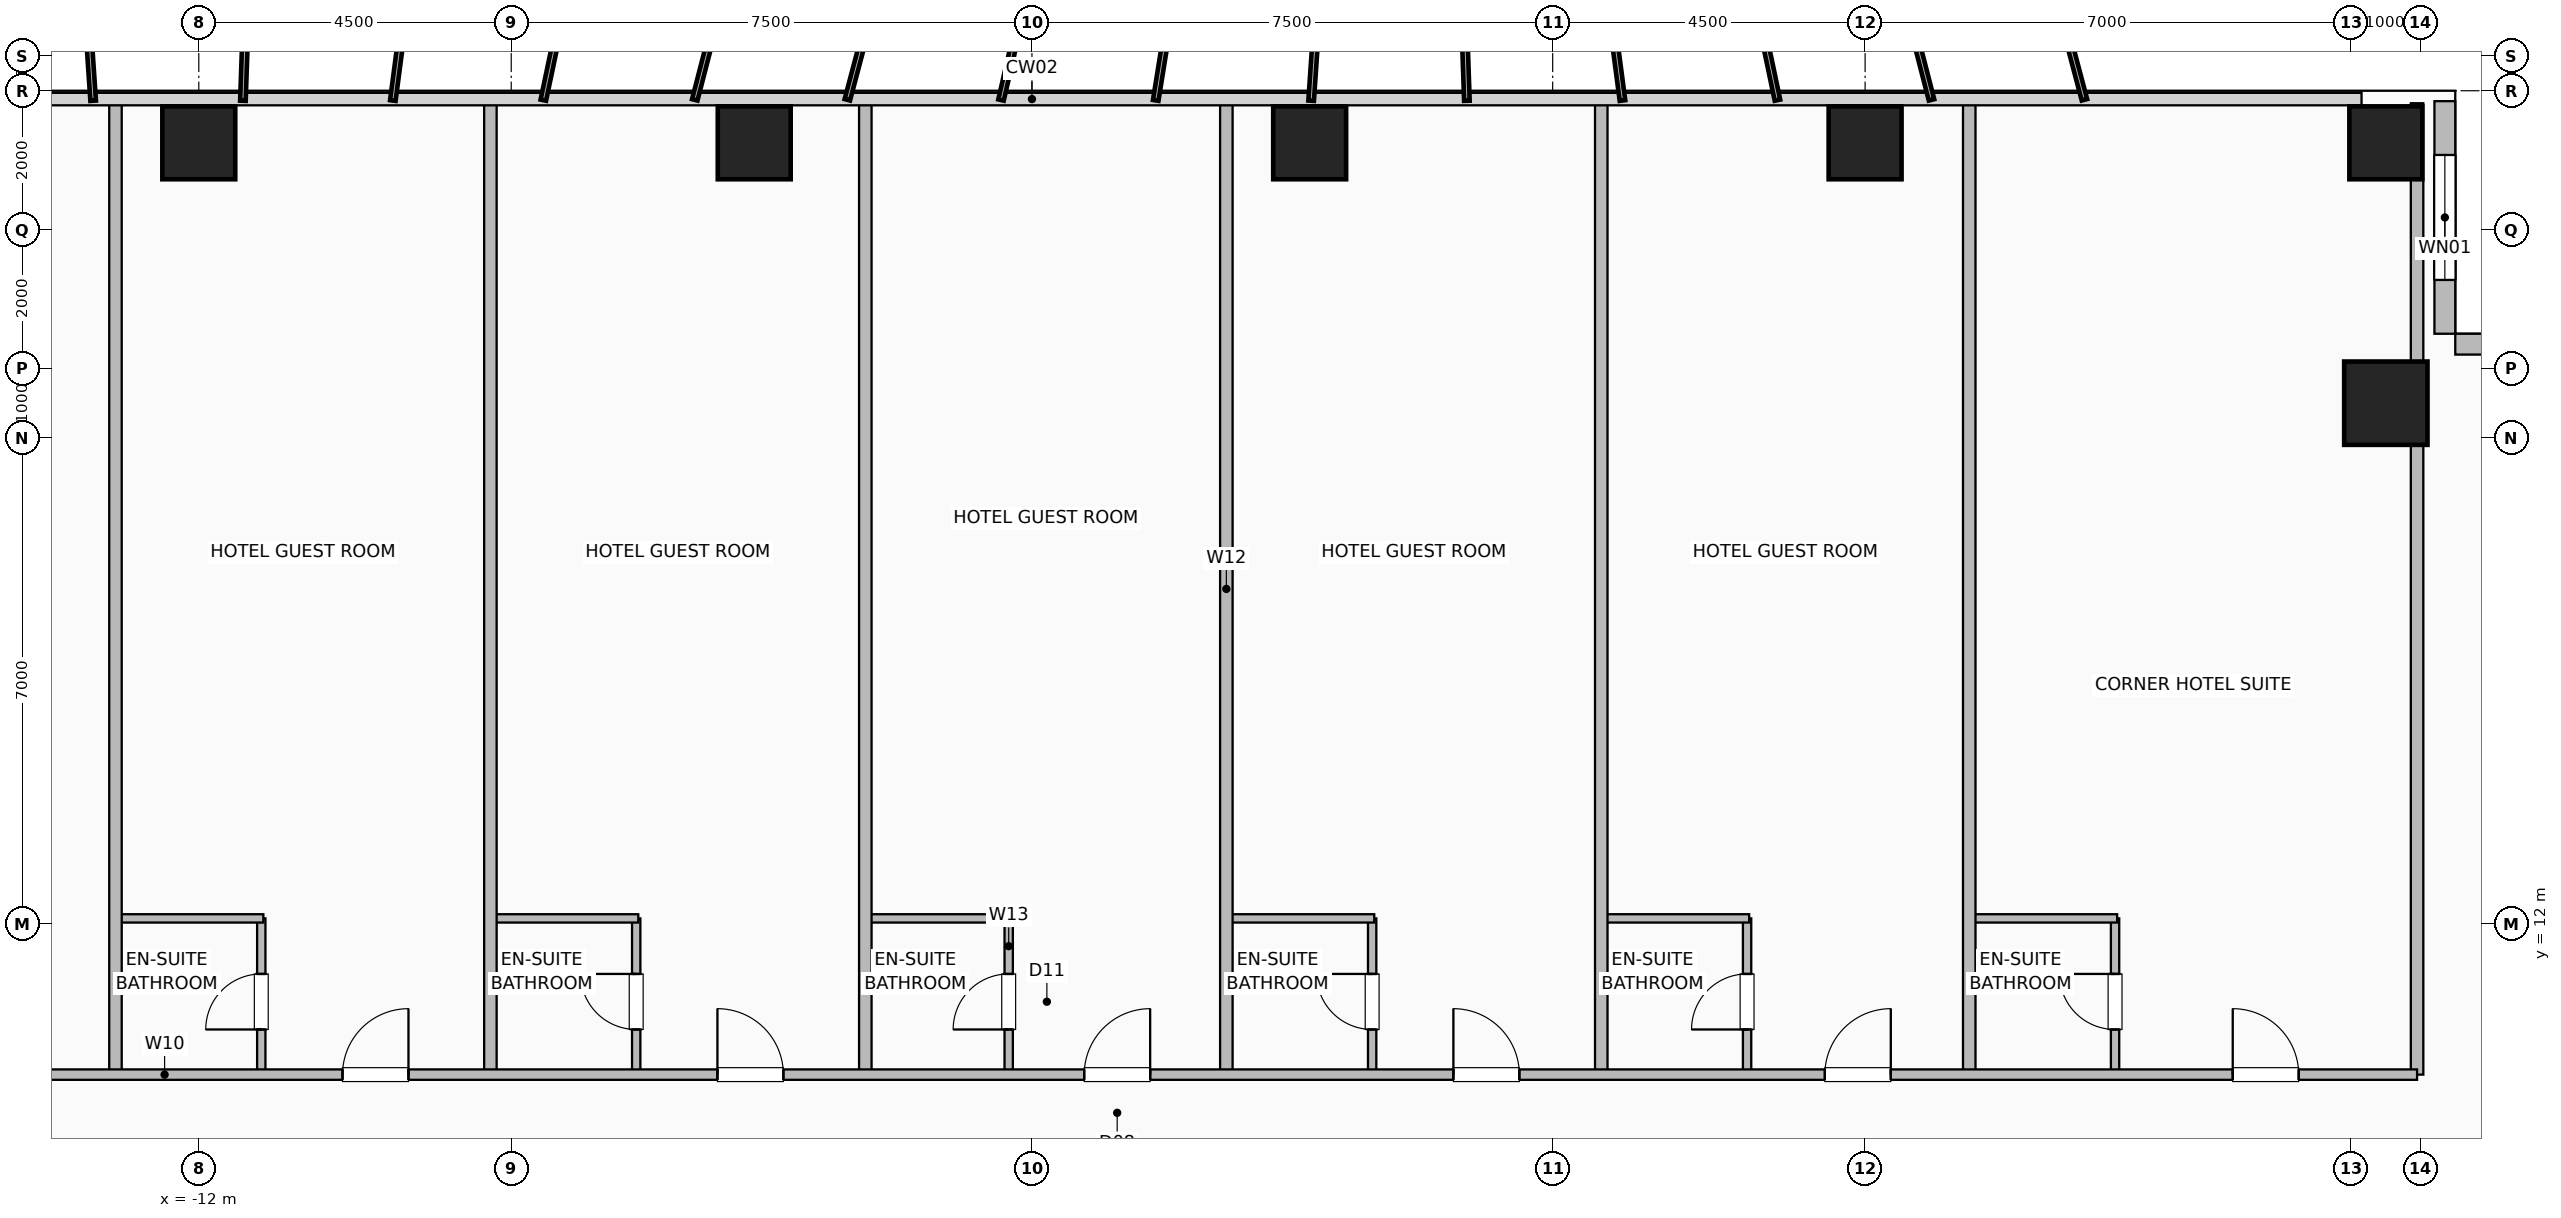
"""IFC4 building model, lengths in metres.
Left out: names, types, materials, properties, quantities, classifications, styles, units other than length and angle.
Written with IfcOpenShell. Run it as: python <this file> out.ifc"""

import sys

from ifc_helpers import new_model, si_unit, direction, frame, frame_2d, origin, origin_2d, place, context, subcontext, project, spatial, rectangle, hollow_rectangle, extrude, element, fill, save


model = new_model("IFC4")
c1 = context("Model", 3, precision=1e-05, world=origin(), true_north=direction((0.0, 1.0)))
c2 = subcontext(c1, "Body", "Model", "MODEL_VIEW")
j1 = project(units=[si_unit("LENGTHUNIT", "METRE"), si_unit("PLANEANGLEUNIT", "RADIAN")], contexts=[c1])
p1 = place(None, origin())
s1 = spatial("IfcSite", under=j1, at=p1, CompositionType="ELEMENT")
p2 = place(p1, origin())
s2 = spatial("IfcBuilding", under=s1, at=p2, CompositionType="ELEMENT")
p3 = place(p2, frame((0.0, 0.0, 69.0)))
s3 = spatial("IfcBuildingStorey", under=s2, at=p3, CompositionType="ELEMENT", Elevation=69.0)
for number, where, z_axis, x_axis in (
    (1, (-12.0, 23.25, 0.0), (0.0, 0.0, 1.0), (1.0, 0.0, 0.0)),
    (2, (-4.0, 23.25, 0.0), (0.0, 0.0, 1.0), (1.0, 0.0, 0.0)),
    (3, (4.0, 23.25, 0.0), (0.0, 0.0, 1.0), (1.0, 0.0, 0.0)),
    (4, (12.0, 23.25, 0.0), (0.0, 0.0, 1.0), (1.0, 0.0, 0.0)),
    (5, (19.5, 23.25, 0.0), (0.0, 0.0, 1.0), (1.0, 0.0, 0.0)),
):
    element("IfcColumn", number, at=place(p3, frame(where, z_axis=z_axis, x_axis=x_axis)), inside=s3, PredefinedType="COLUMN", context=c2, shape_type="SweptSolid", body=[
        extrude(hollow_rectangle(XDim=1.05, YDim=1.05, WallThickness=0.05, at=origin_2d()), origin(), (0.0, 0.0, 1.0), 3.5),
    ])
p4 = place(p3, frame((19.5, 19.5, 0.0), z_axis=(0.0, 0.0, 1.0), x_axis=(1.0, 0.0, 0.0)))
e6 = element("IfcColumn", 6, at=p4, inside=s3, PredefinedType="COLUMN", context=c2, shape_type="SweptSolid", body=[
    extrude(hollow_rectangle(XDim=1.2, YDim=1.2, WallThickness=0.055, at=origin_2d()), origin(), (0.0, 0.0, 1.0), 3.5),
])
p5 = place(p3, frame((20.35, 23.85, 0.0), z_axis=(0.0, 0.0, 1.0), x_axis=(0.0, -1.0, 0.0)))
e7 = element("IfcWall", 7, at=p5, inside=s3, PredefinedType="SOLIDWALL", context=c2, shape_type="SweptSolid", body=[
    extrude(rectangle(XDim=3.35, YDim=0.3, at=frame_2d((1.675, 0.0))), origin(), (0.0, 0.0, 1.0), 3.25),
])
p6 = place(p5, frame((0.775, 0.0, 0.9)))
e8 = element("IfcOpeningElement", 8, at=p6, cuts=e7, PredefinedType="OPENING", context=c2, shape_type="SweptSolid", body=[
    extrude(rectangle(XDim=1.8, YDim=1.8, at=frame_2d((0.9, 0.9))), frame((0.0, 0.16, 0.0), z_axis=(0.0, -1.0, 0.0), x_axis=(1.0, 0.0, 0.0)), (0.0, 0.0, 1.0), 0.32),
])
p7 = place(p3, frame((23.85, 20.35, 0.0), z_axis=(0.0, 0.0, 1.0), x_axis=(-1.0, 0.0, 0.0)))
e9 = element("IfcWall", 9, at=p7, inside=s3, PredefinedType="SOLIDWALL", context=c2, shape_type="SweptSolid", body=[
    extrude(rectangle(XDim=3.35, YDim=0.3, at=frame_2d((1.675, 0.0))), origin(), (0.0, 0.0, 1.0), 3.25),
])
p8 = place(p3, frame((-11.1, 9.83, 0.0), z_axis=(0.0, 0.0, 1.0), x_axis=(0.0, 1.0, 0.0)))
e10 = element("IfcWall", 10, at=p8, inside=s3, PredefinedType="PLUMBINGWALL", context=c2, shape_type="SweptSolid", body=[
    extrude(rectangle(XDim=2.25, YDim=0.12, at=frame_2d((1.125, 0.0))), origin(), (0.0, 0.0, 1.0), 3.25),
])
p9 = place(p8, frame((0.65, 0.0, 0.0)))
e11 = element("IfcOpeningElement", 11, at=p9, cuts=e10, PredefinedType="OPENING", context=c2, shape_type="SweptSolid", body=[
    extrude(rectangle(XDim=0.8, YDim=2.05, at=frame_2d((0.4, 1.025))), frame((0.0, 0.07, 0.0), z_axis=(0.0, -1.0, 0.0), x_axis=(1.0, 0.0, 0.0)), (0.0, 0.0, 1.0), 0.14),
])
p10 = place(p3, frame((-13.17, 12.08, 0.0), z_axis=(0.0, 0.0, 1.0), x_axis=(1.0, 0.0, 0.0)))
e12 = element("IfcWall", 12, at=p10, inside=s3, PredefinedType="PLUMBINGWALL", context=c2, shape_type="SweptSolid", body=[
    extrude(rectangle(XDim=2.1, YDim=0.12, at=frame_2d((1.05, 0.0))), origin(), (0.0, 0.0, 1.0), 3.25),
])
p11 = place(p3, frame((-5.7, 9.83, 0.0), z_axis=(0.0, 0.0, 1.0), x_axis=(0.0, 1.0, 0.0)))
e13 = element("IfcWall", 13, at=p11, inside=s3, PredefinedType="PLUMBINGWALL", context=c2, shape_type="SweptSolid", body=[
    extrude(rectangle(XDim=2.25, YDim=0.12, at=frame_2d((1.125, 0.0))), origin(), (0.0, 0.0, 1.0), 3.25),
])
p12 = place(p11, frame((0.65, 0.0, 0.0)))
e14 = element("IfcOpeningElement", 14, at=p12, cuts=e13, PredefinedType="OPENING", context=c2, shape_type="SweptSolid", body=[
    extrude(rectangle(XDim=0.8, YDim=2.05, at=frame_2d((0.4, 1.025))), frame((0.0, 0.07, 0.0), z_axis=(0.0, -1.0, 0.0), x_axis=(1.0, 0.0, 0.0)), (0.0, 0.0, 1.0), 0.14),
])
p13 = place(p3, frame((-7.77, 12.08, 0.0), z_axis=(0.0, 0.0, 1.0), x_axis=(1.0, 0.0, 0.0)))
e15 = element("IfcWall", 15, at=p13, inside=s3, PredefinedType="PLUMBINGWALL", context=c2, shape_type="SweptSolid", body=[
    extrude(rectangle(XDim=2.1, YDim=0.12, at=frame_2d((1.05, 0.0))), origin(), (0.0, 0.0, 1.0), 3.25),
])
p14 = place(p3, frame((-0.335, 9.83, 0.0), z_axis=(0.0, 0.0, 1.0), x_axis=(0.0, 1.0, 0.0)))
e16 = element("IfcWall", 16, at=p14, inside=s3, PredefinedType="PLUMBINGWALL", context=c2, shape_type="SweptSolid", body=[
    extrude(rectangle(XDim=2.25, YDim=0.12, at=frame_2d((1.125, 0.0))), origin(), (0.0, 0.0, 1.0), 3.25),
])
p15 = place(p14, frame((0.65, 0.0, 0.0)))
e17 = element("IfcOpeningElement", 17, at=p15, cuts=e16, PredefinedType="OPENING", context=c2, shape_type="SweptSolid", body=[
    extrude(rectangle(XDim=0.8, YDim=2.05, at=frame_2d((0.4, 1.025))), frame((0.0, 0.07, 0.0), z_axis=(0.0, -1.0, 0.0), x_axis=(1.0, 0.0, 0.0)), (0.0, 0.0, 1.0), 0.14),
])
p16 = place(p3, frame((-2.37, 12.08, 0.0), z_axis=(0.0, 0.0, 1.0), x_axis=(1.0, 0.0, 0.0)))
e18 = element("IfcWall", 18, at=p16, inside=s3, PredefinedType="PLUMBINGWALL", context=c2, shape_type="SweptSolid", body=[
    extrude(rectangle(XDim=2.065, YDim=0.12, at=frame_2d((1.033, 0.0))), origin(), (0.0, 0.0, 1.0), 3.25),
])
p17 = place(p3, frame((4.9, 9.83, 0.0), z_axis=(0.0, 0.0, 1.0), x_axis=(0.0, 1.0, 0.0)))
e19 = element("IfcWall", 19, at=p17, inside=s3, PredefinedType="PLUMBINGWALL", context=c2, shape_type="SweptSolid", body=[
    extrude(rectangle(XDim=2.25, YDim=0.12, at=frame_2d((1.125, 0.0))), origin(), (0.0, 0.0, 1.0), 2.818),
])
p18 = place(p17, frame((0.65, 0.0, 0.0)))
e20 = element("IfcOpeningElement", 20, at=p18, cuts=e19, PredefinedType="OPENING", context=c2, shape_type="SweptSolid", body=[
    extrude(rectangle(XDim=0.8, YDim=2.05, at=frame_2d((0.4, 1.025))), frame((0.0, 0.07, 0.0), z_axis=(0.0, -1.0, 0.0), x_axis=(1.0, 0.0, 0.0)), (0.0, 0.0, 1.0), 0.14),
])
p19 = place(p3, frame((2.83, 12.08, 0.0), z_axis=(0.0, 0.0, 1.0), x_axis=(1.0, 0.0, 0.0)))
e21 = element("IfcWall", 21, at=p19, inside=s3, PredefinedType="PLUMBINGWALL", context=c2, shape_type="SweptSolid", body=[
    extrude(rectangle(XDim=2.1, YDim=0.12, at=frame_2d((1.05, 0.0))), origin(), (0.0, 0.0, 1.0), 3.25),
])
p20 = place(p3, frame((10.3, 9.83, 0.0), z_axis=(0.0, 0.0, 1.0), x_axis=(0.0, 1.0, 0.0)))
e22 = element("IfcWall", 22, at=p20, inside=s3, PredefinedType="PLUMBINGWALL", context=c2, shape_type="SweptSolid", body=[
    extrude(rectangle(XDim=2.25, YDim=0.12, at=frame_2d((1.125, 0.0))), origin(), (0.0, 0.0, 1.0), 3.25),
])
p21 = place(p20, frame((0.65, 0.0, 0.0)))
e23 = element("IfcOpeningElement", 23, at=p21, cuts=e22, PredefinedType="OPENING", context=c2, shape_type="SweptSolid", body=[
    extrude(rectangle(XDim=0.8, YDim=2.05, at=frame_2d((0.4, 1.025))), frame((0.0, 0.07, 0.0), z_axis=(0.0, -1.0, 0.0), x_axis=(1.0, 0.0, 0.0)), (0.0, 0.0, 1.0), 0.14),
])
p22 = place(p3, frame((8.23, 12.08, 0.0), z_axis=(0.0, 0.0, 1.0), x_axis=(1.0, 0.0, 0.0)))
e24 = element("IfcWall", 24, at=p22, inside=s3, PredefinedType="PLUMBINGWALL", context=c2, shape_type="SweptSolid", body=[
    extrude(rectangle(XDim=2.1, YDim=0.12, at=frame_2d((1.05, 0.0))), origin(), (0.0, 0.0, 1.0), 3.25),
])
p23 = place(p3, frame((15.6, 9.83, 0.0), z_axis=(0.0, 0.0, 1.0), x_axis=(0.0, 1.0, 0.0)))
e25 = element("IfcWall", 25, at=p23, inside=s3, PredefinedType="PLUMBINGWALL", context=c2, shape_type="SweptSolid", body=[
    extrude(rectangle(XDim=2.25, YDim=0.12, at=frame_2d((1.125, 0.0))), origin(), (0.0, 0.0, 1.0), 3.25),
])
p24 = place(p23, frame((0.65, 0.0, 0.0)))
e26 = element("IfcOpeningElement", 26, at=p24, cuts=e25, PredefinedType="OPENING", context=c2, shape_type="SweptSolid", body=[
    extrude(rectangle(XDim=0.8, YDim=2.05, at=frame_2d((0.4, 1.025))), frame((0.0, 0.07, 0.0), z_axis=(0.0, -1.0, 0.0), x_axis=(1.0, 0.0, 0.0)), (0.0, 0.0, 1.0), 0.14),
])
p25 = place(p3, frame((13.53, 12.08, 0.0), z_axis=(0.0, 0.0, 1.0), x_axis=(1.0, 0.0, 0.0)))
e27 = element("IfcWall", 27, at=p25, inside=s3, PredefinedType="PLUMBINGWALL", context=c2, shape_type="SweptSolid", body=[
    extrude(rectangle(XDim=2.1, YDim=0.12, at=frame_2d((1.05, 0.0))), origin(), (0.0, 0.0, 1.0), 3.25),
])
for number, where, z_axis, x_axis in (
    (28, (-13.2, 9.83, 0.0), (0.0, 0.0, 1.0), (0.0, 1.0, 0.0)),
    (29, (-7.8, 9.83, 0.0), (0.0, 0.0, 1.0), (0.0, 1.0, 0.0)),
    (30, (-2.4, 9.83, 0.0), (0.0, 0.0, 1.0), (0.0, 1.0, 0.0)),
    (31, (2.8, 9.83, 0.0), (0.0, 0.0, 1.0), (0.0, 1.0, 0.0)),
    (32, (8.2, 9.83, 0.0), (0.0, 0.0, 1.0), (0.0, 1.0, 0.0)),
    (33, (13.5, 9.83, 0.0), (0.0, 0.0, 1.0), (0.0, 1.0, 0.0)),
    (34, (19.95, 9.83, 0.0), (0.0, 0.0, 1.0), (0.0, 1.0, 0.0)),
):
    element("IfcWall", number, at=place(p3, frame(where, z_axis=z_axis, x_axis=x_axis)), inside=s3, PredefinedType="PARTITIONING", context=c2, shape_type="SweptSolid", body=[
        extrude(rectangle(XDim=13.99, YDim=0.18, at=frame_2d((6.995, 0.0))), origin(), (0.0, 0.0, 1.0), 3.25),
    ])
p26 = place(p3, frame((-19.95, 9.83, 0.0), z_axis=(0.0, 0.0, 1.0), x_axis=(1.0, 0.0, 0.0)))
e35 = element("IfcWall", 35, at=p26, inside=s3, PredefinedType="PARTITIONING", context=c2, shape_type="SweptSolid", body=[
    extrude(rectangle(XDim=39.9, YDim=0.15, at=frame_2d((19.95, 0.0))), origin(), (0.0, 0.0, 1.0), 3.25),
])
p27 = place(p26, frame((3.945, 0.0, 0.0)))
e36 = element("IfcOpeningElement", 36, at=p27, cuts=e35, PredefinedType="OPENING", context=c2, shape_type="SweptSolid", body=[
    extrude(rectangle(XDim=0.95, YDim=2.08, at=frame_2d((0.475, 1.04))), frame((0.0, 0.085, 0.0), z_axis=(0.0, -1.0, 0.0), x_axis=(1.0, 0.0, 0.0)), (0.0, 0.0, 1.0), 0.17),
])
p28 = place(p26, frame((10.02, 0.0, 0.0)))
e37 = element("IfcOpeningElement", 37, at=p28, cuts=e35, PredefinedType="OPENING", context=c2, shape_type="SweptSolid", body=[
    extrude(rectangle(XDim=0.95, YDim=2.08, at=frame_2d((0.475, 1.04))), frame((0.0, 0.085, 0.0), z_axis=(0.0, -1.0, 0.0), x_axis=(1.0, 0.0, 0.0)), (0.0, 0.0, 1.0), 0.17),
])
p29 = place(p26, frame((15.42, 0.0, 0.0)))
e38 = element("IfcOpeningElement", 38, at=p29, cuts=e35, PredefinedType="OPENING", context=c2, shape_type="SweptSolid", body=[
    extrude(rectangle(XDim=0.95, YDim=2.08, at=frame_2d((0.475, 1.04))), frame((0.0, 0.085, 0.0), z_axis=(0.0, -1.0, 0.0), x_axis=(1.0, 0.0, 0.0)), (0.0, 0.0, 1.0), 0.17),
])
p30 = place(p26, frame((20.702, 0.0, 0.0)))
e39 = element("IfcOpeningElement", 39, at=p30, cuts=e35, PredefinedType="OPENING", context=c2, shape_type="SweptSolid", body=[
    extrude(rectangle(XDim=0.95, YDim=2.08, at=frame_2d((0.475, 1.04))), frame((0.0, 0.085, 0.0), z_axis=(0.0, -1.0, 0.0), x_axis=(1.0, 0.0, 0.0)), (0.0, 0.0, 1.0), 0.17),
])
p31 = place(p26, frame((26.02, 0.0, 0.0)))
e40 = element("IfcOpeningElement", 40, at=p31, cuts=e35, PredefinedType="OPENING", context=c2, shape_type="SweptSolid", body=[
    extrude(rectangle(XDim=0.95, YDim=2.08, at=frame_2d((0.475, 1.04))), frame((0.0, 0.085, 0.0), z_axis=(0.0, -1.0, 0.0), x_axis=(1.0, 0.0, 0.0)), (0.0, 0.0, 1.0), 0.17),
])
p32 = place(p26, frame((31.37, 0.0, 0.0)))
e41 = element("IfcOpeningElement", 41, at=p32, cuts=e35, PredefinedType="OPENING", context=c2, shape_type="SweptSolid", body=[
    extrude(rectangle(XDim=0.95, YDim=2.08, at=frame_2d((0.475, 1.04))), frame((0.0, 0.085, 0.0), z_axis=(0.0, -1.0, 0.0), x_axis=(1.0, 0.0, 0.0)), (0.0, 0.0, 1.0), 0.17),
])
p33 = place(p26, frame((37.245, 0.0, 0.0)))
e42 = element("IfcOpeningElement", 42, at=p33, cuts=e35, PredefinedType="OPENING", context=c2, shape_type="SweptSolid", body=[
    extrude(rectangle(XDim=0.95, YDim=2.08, at=frame_2d((0.475, 1.04))), frame((0.0, 0.085, 0.0), z_axis=(0.0, -1.0, 0.0), x_axis=(1.0, 0.0, 0.0)), (0.0, 0.0, 1.0), 0.17),
])
p34 = place(p6, origin())
e43 = element("IfcWindow", 43, at=p34, inside=s3, PartitioningType="SINGLE_PANEL", PredefinedType="WINDOW", context=c2, shape_type="SweptSolid", body=[
    extrude(rectangle(XDim=1.8, YDim=1.8, at=frame_2d((0.9, 0.9))), frame((0.0, 0.03, 0.0), z_axis=(0.0, -1.0, 0.0), x_axis=(1.0, 0.0, 0.0)), (0.0, 0.0, 1.0), 0.06),
])
fill(e8, e43)
p35 = place(p9, origin())
e44 = element("IfcDoor", 44, at=p35, inside=s3, OperationType="SINGLE_SWING_LEFT", PredefinedType="DOOR", context=c2, shape_type="SweptSolid", body=[
    extrude(rectangle(XDim=0.8, YDim=2.05, at=frame_2d((0.4, 1.025))), frame((0.0, 0.025, 0.0), z_axis=(0.0, -1.0, 0.0), x_axis=(1.0, 0.0, 0.0)), (0.0, 0.0, 1.0), 0.05),
])
fill(e11, e44)
p36 = place(p12, origin())
e45 = element("IfcDoor", 45, at=p36, inside=s3, OperationType="SINGLE_SWING_RIGHT", PredefinedType="DOOR", context=c2, shape_type="SweptSolid", body=[
    extrude(rectangle(XDim=0.8, YDim=2.05, at=frame_2d((0.4, 1.025))), frame((0.0, 0.025, 0.0), z_axis=(0.0, -1.0, 0.0), x_axis=(1.0, 0.0, 0.0)), (0.0, 0.0, 1.0), 0.05),
])
fill(e14, e45)
p37 = place(p15, origin())
e46 = element("IfcDoor", 46, at=p37, inside=s3, OperationType="SINGLE_SWING_LEFT", PredefinedType="DOOR", context=c2, shape_type="SweptSolid", body=[
    extrude(rectangle(XDim=0.8, YDim=2.05, at=frame_2d((0.4, 1.025))), frame((0.0, 0.025, 0.0), z_axis=(0.0, -1.0, 0.0), x_axis=(1.0, 0.0, 0.0)), (0.0, 0.0, 1.0), 0.05),
])
fill(e17, e46)
p38 = place(p18, origin())
e47 = element("IfcDoor", 47, at=p38, inside=s3, OperationType="SINGLE_SWING_RIGHT", PredefinedType="DOOR", context=c2, shape_type="SweptSolid", body=[
    extrude(rectangle(XDim=0.8, YDim=2.05, at=frame_2d((0.4, 1.025))), frame((0.0, 0.025, 0.0), z_axis=(0.0, -1.0, 0.0), x_axis=(1.0, 0.0, 0.0)), (0.0, 0.0, 1.0), 0.05),
])
fill(e20, e47)
p39 = place(p21, origin())
e48 = element("IfcDoor", 48, at=p39, inside=s3, OperationType="SINGLE_SWING_LEFT", PredefinedType="DOOR", context=c2, shape_type="SweptSolid", body=[
    extrude(rectangle(XDim=0.8, YDim=2.05, at=frame_2d((0.4, 1.025))), frame((0.0, 0.025, 0.0), z_axis=(0.0, -1.0, 0.0), x_axis=(1.0, 0.0, 0.0)), (0.0, 0.0, 1.0), 0.05),
])
fill(e23, e48)
p40 = place(p24, origin())
e49 = element("IfcDoor", 49, at=p40, inside=s3, OperationType="SINGLE_SWING_RIGHT", PredefinedType="DOOR", context=c2, shape_type="SweptSolid", body=[
    extrude(rectangle(XDim=0.8, YDim=2.05, at=frame_2d((0.4, 1.025))), frame((0.0, 0.025, 0.0), z_axis=(0.0, -1.0, 0.0), x_axis=(1.0, 0.0, 0.0)), (0.0, 0.0, 1.0), 0.05),
])
fill(e26, e49)
p41 = place(p28, origin())
e50 = element("IfcDoor", 50, at=p41, inside=s3, OperationType="SINGLE_SWING_RIGHT", PredefinedType="DOOR", context=c2, shape_type="SweptSolid", body=[
    extrude(rectangle(XDim=0.95, YDim=2.08, at=frame_2d((0.475, 1.04))), frame((0.0, 0.025, 0.0), z_axis=(0.0, -1.0, 0.0), x_axis=(1.0, 0.0, 0.0)), (0.0, 0.0, 1.0), 0.05),
])
fill(e37, e50)
p42 = place(p29, origin())
e51 = element("IfcDoor", 51, at=p42, inside=s3, OperationType="SINGLE_SWING_LEFT", PredefinedType="DOOR", context=c2, shape_type="SweptSolid", body=[
    extrude(rectangle(XDim=0.95, YDim=2.08, at=frame_2d((0.475, 1.04))), frame((0.0, 0.025, 0.0), z_axis=(0.0, -1.0, 0.0), x_axis=(1.0, 0.0, 0.0)), (0.0, 0.0, 1.0), 0.05),
])
fill(e38, e51)
p43 = place(p30, origin())
e52 = element("IfcDoor", 52, at=p43, inside=s3, OperationType="SINGLE_SWING_RIGHT", PredefinedType="DOOR", context=c2, shape_type="SweptSolid", body=[
    extrude(rectangle(XDim=0.95, YDim=2.08, at=frame_2d((0.475, 1.04))), frame((0.0, 0.025, 0.0), z_axis=(0.0, -1.0, 0.0), x_axis=(1.0, 0.0, 0.0)), (0.0, 0.0, 1.0), 0.05),
])
fill(e39, e52)
p44 = place(p31, origin())
e53 = element("IfcDoor", 53, at=p44, inside=s3, OperationType="SINGLE_SWING_LEFT", PredefinedType="DOOR", context=c2, shape_type="SweptSolid", body=[
    extrude(rectangle(XDim=0.95, YDim=2.08, at=frame_2d((0.475, 1.04))), frame((0.0, 0.025, 0.0), z_axis=(0.0, -1.0, 0.0), x_axis=(1.0, 0.0, 0.0)), (0.0, 0.0, 1.0), 0.05),
])
fill(e40, e53)
p45 = place(p32, origin())
e54 = element("IfcDoor", 54, at=p45, inside=s3, OperationType="SINGLE_SWING_RIGHT", PredefinedType="DOOR", context=c2, shape_type="SweptSolid", body=[
    extrude(rectangle(XDim=0.95, YDim=2.08, at=frame_2d((0.475, 1.04))), frame((0.0, 0.025, 0.0), z_axis=(0.0, -1.0, 0.0), x_axis=(1.0, 0.0, 0.0)), (0.0, 0.0, 1.0), 0.05),
])
fill(e41, e54)
p46 = place(p33, origin())
e55 = element("IfcDoor", 55, at=p46, inside=s3, OperationType="SINGLE_SWING_LEFT", PredefinedType="DOOR", context=c2, shape_type="SweptSolid", body=[
    extrude(rectangle(XDim=0.95, YDim=2.08, at=frame_2d((0.475, 1.04))), frame((0.0, 0.025, 0.0), z_axis=(0.0, -1.0, 0.0), x_axis=(1.0, 0.0, 0.0)), (0.0, 0.0, 1.0), 0.05),
])
fill(e42, e55)
save(model, sys.argv[1])
